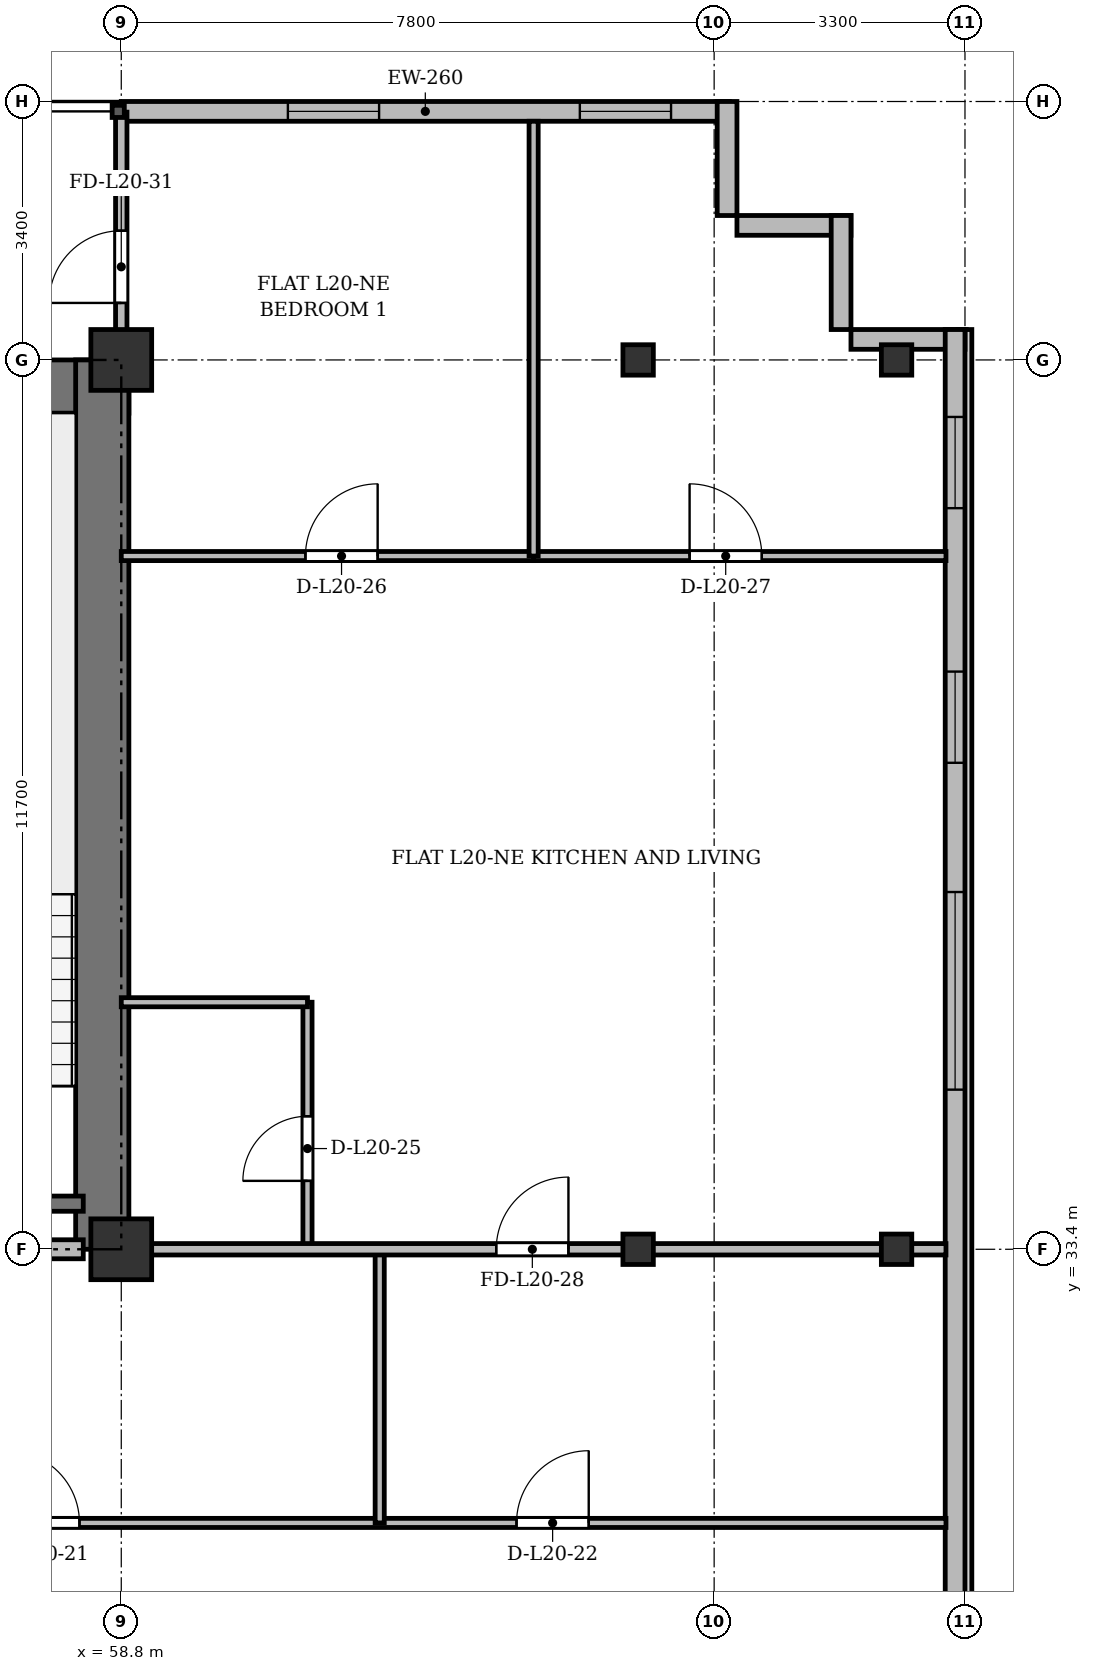
"""IFC4 building model, lengths in metres.
Left out: names, types, materials, properties, quantities, classifications, styles, units other than length and angle.
Written with IfcOpenShell. Run it as: python <this file> out.ifc"""

import sys

from ifc_helpers import new_model, si_unit, direction, frame, frame_2d, origin, origin_2d, place, context, subcontext, project, spatial, rectangle, i_section, extrude, source, transform, mapped, element, fill, save


model = new_model("IFC4")
c1 = context("Model", 3, precision=1e-05, world=origin(), true_north=direction((0.0, 1.0)))
c2 = subcontext(c1, "Body", "Model", "MODEL_VIEW")
j1 = project(units=[si_unit("LENGTHUNIT", "METRE"), si_unit("PLANEANGLEUNIT", "RADIAN")], contexts=[c1])
p1 = place(None, origin())
s1 = spatial("IfcSite", under=j1, at=p1, CompositionType="ELEMENT")
p2 = place(p1, origin())
s2 = spatial("IfcBuilding", under=s1, at=p2, CompositionType="ELEMENT")
p3 = place(p2, frame((0.0, 0.0, 81.7)))
s3 = spatial("IfcBuildingStorey", under=s2, at=p3, CompositionType="ELEMENT", Elevation=81.7)
m1 = source(origin(), c2, "Body", "SweptSolid", [
    extrude(rectangle(XDim=0.8, YDim=0.8, at=origin_2d()), origin(), (0.0, 0.0, 1.0), 3.6),
])
for number, where, z_axis, x_axis in (
    (1, (58.8, 33.4, 0.0), (0.0, 0.0, 1.0), (1.0, 0.0, 0.0)),
    (2, (58.8, 45.1, 0.0), (0.0, 0.0, 1.0), (1.0, 0.0, 0.0)),
):
    element("IfcColumn", number, at=place(p3, frame(where, z_axis=z_axis, x_axis=x_axis)), inside=s3, PredefinedType="COLUMN", context=c2, shape_type="MappedRepresentation", body=[
        mapped(m1, transform((0.0, 0.0, 0.0), x_axis=(1.0, 0.0, 0.0), y_axis=(0.0, 1.0, 0.0), z_axis=(0.0, 0.0, 1.0), scale=1.0)),
    ])
m2 = source(origin(), c2, "Body", "SweptSolid", [
    extrude(i_section(OverallWidth=0.4, OverallDepth=0.4, WebThickness=0.022, FlangeThickness=0.035, at=origin_2d()), origin(), (0.0, 0.0, 1.0), 3.6),
])
for number, where, z_axis, x_axis in (
    (3, (65.6, 33.4, 0.0), (0.0, 0.0, 1.0), (1.0, 0.0, 0.0)),
    (4, (65.6, 45.1, 0.0), (0.0, 0.0, 1.0), (1.0, 0.0, 0.0)),
    (5, (69.0, 33.4, 0.0), (0.0, 0.0, 1.0), (1.0, 0.0, 0.0)),
    (6, (69.0, 45.1, 0.0), (0.0, 0.0, 1.0), (1.0, 0.0, 0.0)),
):
    element("IfcColumn", number, at=place(p3, frame(where, z_axis=z_axis, x_axis=x_axis)), inside=s3, PredefinedType="COLUMN", context=c2, shape_type="MappedRepresentation", body=[
        mapped(m2, transform((0.0, 0.0, 0.0), x_axis=(1.0, 0.0, 0.0), y_axis=(0.0, 1.0, 0.0), z_axis=(0.0, 0.0, 1.0), scale=1.0)),
    ])
p4 = place(p3, frame((58.8, 48.37, 0.0), z_axis=(0.0, 0.0, 1.0), x_axis=(1.0, 0.0, 0.0)))
e7 = element("IfcWall", 7, at=p4, inside=s3, PredefinedType="SOLIDWALL", context=c2, shape_type="SweptSolid", body=[
    extrude(rectangle(XDim=8.0, YDim=0.26, at=frame_2d((4.0, 0.0))), origin(), (0.0, 0.0, 1.0), 3.34),
])
p5 = place(p4, frame((2.192, 0.0, 0.9)))
e8 = element("IfcOpeningElement", 8, at=p5, cuts=e7, PredefinedType="OPENING", context=c2, shape_type="SweptSolid", body=[
    extrude(rectangle(XDim=1.2, YDim=1.65, at=frame_2d((0.6, 0.825))), frame((0.0, 0.14, 0.0), z_axis=(0.0, -1.0, 0.0), x_axis=(1.0, 0.0, 0.0)), (0.0, 0.0, 1.0), 0.28),
])
p6 = place(p4, frame((6.033, 0.0, 0.9)))
e9 = element("IfcOpeningElement", 9, at=p6, cuts=e7, PredefinedType="OPENING", context=c2, shape_type="SweptSolid", body=[
    extrude(rectangle(XDim=1.2, YDim=1.65, at=frame_2d((0.6, 0.825))), frame((0.0, 0.14, 0.0), z_axis=(0.0, -1.0, 0.0), x_axis=(1.0, 0.0, 0.0)), (0.0, 0.0, 1.0), 0.28),
])
for number, where, z_axis, x_axis in (
    (10, (66.77, 48.5, 0.0), (0.0, 0.0, 1.0), (0.0, -1.0, 0.0)),
    (11, (66.9, 46.87, 0.0), (0.0, 0.0, 1.0), (1.0, 0.0, 0.0)),
    (12, (68.27, 47.0, 0.0), (0.0, 0.0, 1.0), (0.0, -1.0, 0.0)),
):
    element("IfcWall", number, at=place(p3, frame(where, z_axis=z_axis, x_axis=x_axis)), inside=s3, PredefinedType="SOLIDWALL", context=c2, shape_type="SweptSolid", body=[
        extrude(rectangle(XDim=1.5, YDim=0.26, at=frame_2d((0.75, 0.0))), origin(), (0.0, 0.0, 1.0), 3.34),
    ])
p7 = place(p3, frame((68.4, 45.37, 0.0), z_axis=(0.0, 0.0, 1.0), x_axis=(1.0, 0.0, 0.0)))
e13 = element("IfcWall", 13, at=p7, inside=s3, PredefinedType="SOLIDWALL", context=c2, shape_type="SweptSolid", body=[
    extrude(rectangle(XDim=1.5, YDim=0.26, at=frame_2d((0.75, 0.0))), origin(), (0.0, 0.0, 1.0), 2.752),
])
p8 = place(p3, frame((69.77, 45.5, 0.0), z_axis=(0.0, 0.0, 1.0), x_axis=(0.0, -1.0, 0.0)))
e14 = element("IfcWall", 14, at=p8, inside=s3, PredefinedType="SOLIDWALL", context=c2, shape_type="SweptSolid", body=[
    extrude(rectangle(XDim=39.6, YDim=0.26, at=frame_2d((19.8, 0.0))), origin(), (0.0, 0.0, 1.0), 3.34),
])
p9 = place(p8, frame((36.95, 0.0, 0.92)))
e15 = element("IfcOpeningElement", 15, at=p9, cuts=e14, PredefinedType="OPENING", context=c2, shape_type="SweptSolid", body=[
    extrude(rectangle(XDim=1.2, YDim=1.65, at=frame_2d((0.6, 0.825))), frame((0.0, 0.14, 0.0), z_axis=(0.0, -1.0, 0.0), x_axis=(1.0, 0.0, 0.0)), (0.0, 0.0, 1.0), 0.28),
])
p10 = place(p8, frame((32.8, 0.0, 0.92)))
e16 = element("IfcOpeningElement", 16, at=p10, cuts=e14, PredefinedType="OPENING", context=c2, shape_type="SweptSolid", body=[
    extrude(rectangle(XDim=2.6, YDim=1.9, at=frame_2d((1.3, 0.95))), frame((0.0, 0.14, 0.0), z_axis=(0.0, -1.0, 0.0), x_axis=(1.0, 0.0, 0.0)), (0.0, 0.0, 1.0), 0.28),
])
p11 = place(p8, frame((28.6, 0.0, 0.92)))
e17 = element("IfcOpeningElement", 17, at=p11, cuts=e14, PredefinedType="OPENING", context=c2, shape_type="SweptSolid", body=[
    extrude(rectangle(XDim=2.6, YDim=1.9, at=frame_2d((1.3, 0.95))), frame((0.0, 0.14, 0.0), z_axis=(0.0, -1.0, 0.0), x_axis=(1.0, 0.0, 0.0)), (0.0, 0.0, 1.0), 0.28),
])
p12 = place(p8, frame((21.4, 0.0, 0.92)))
e18 = element("IfcOpeningElement", 18, at=p12, cuts=e14, PredefinedType="OPENING", context=c2, shape_type="SweptSolid", body=[
    extrude(rectangle(XDim=2.6, YDim=1.9, at=frame_2d((1.3, 0.95))), frame((0.0, 0.14, 0.0), z_axis=(0.0, -1.0, 0.0), x_axis=(1.0, 0.0, 0.0)), (0.0, 0.0, 1.0), 0.28),
])
p13 = place(p8, frame((7.4, 0.0, 0.92)))
e19 = element("IfcOpeningElement", 19, at=p13, cuts=e14, PredefinedType="OPENING", context=c2, shape_type="SweptSolid", body=[
    extrude(rectangle(XDim=2.6, YDim=1.9, at=frame_2d((1.3, 0.95))), frame((0.0, 0.14, 0.0), z_axis=(0.0, -1.0, 0.0), x_axis=(1.0, 0.0, 0.0)), (0.0, 0.0, 1.0), 0.28),
])
p14 = place(p8, frame((4.5, 0.0, 0.92)))
e20 = element("IfcOpeningElement", 20, at=p14, cuts=e14, PredefinedType="OPENING", context=c2, shape_type="SweptSolid", body=[
    extrude(rectangle(XDim=1.2, YDim=1.65, at=frame_2d((0.6, 0.825))), frame((0.0, 0.14, 0.0), z_axis=(0.0, -1.0, 0.0), x_axis=(1.0, 0.0, 0.0)), (0.0, 0.0, 1.0), 0.28),
])
p15 = place(p8, frame((1.15, 0.0, 0.92)))
e21 = element("IfcOpeningElement", 21, at=p15, cuts=e14, PredefinedType="OPENING", context=c2, shape_type="SweptSolid", body=[
    extrude(rectangle(XDim=1.2, YDim=1.65, at=frame_2d((0.6, 0.825))), frame((0.0, 0.14, 0.0), z_axis=(0.0, -1.0, 0.0), x_axis=(1.0, 0.0, 0.0)), (0.0, 0.0, 1.0), 0.28),
])
p16 = place(p3, frame((15.5, 44.75, 0.0), z_axis=(0.0, 0.0, 1.0), x_axis=(1.0, 0.0, 0.0)))
e22 = element("IfcWall", 22, at=p16, inside=s3, PredefinedType="SHEAR", context=c2, shape_type="SweptSolid", body=[
    extrude(rectangle(XDim=43.4, YDim=0.7, at=frame_2d((21.7, 0.0))), origin(), (0.0, 0.0, 1.0), 3.34),
])
p17 = place(p3, frame((58.55, 33.4, 0.0), z_axis=(0.0, 0.0, 1.0), x_axis=(0.0, 1.0, 0.0)))
e23 = element("IfcWall", 23, at=p17, inside=s3, PredefinedType="SHEAR", context=c2, shape_type="SweptSolid", body=[
    extrude(rectangle(XDim=11.7, YDim=0.7, at=frame_2d((5.85, 0.0))), origin(), (0.0, 0.0, 1.0), 3.34),
])
p18 = place(p3, frame((54.9, 34.0, 0.0), z_axis=(0.0, 0.0, 1.0), x_axis=(1.0, 0.0, 0.0)))
e24 = element("IfcWall", 24, at=p18, inside=s3, PredefinedType="SHEAR", context=c2, shape_type="SweptSolid", body=[
    extrude(rectangle(XDim=3.4, YDim=0.2, at=frame_2d((1.7, 0.0))), origin(), (0.0, 0.0, 1.0), 3.34),
])
p19 = place(p3, frame((47.15, 33.4, 0.0), z_axis=(0.0, 0.0, 1.0), x_axis=(1.0, 0.0, 0.0)))
e25 = element("IfcWall", 25, at=p19, inside=s3, PredefinedType="PARTITIONING", context=c2, shape_type="SweptSolid", body=[
    extrude(rectangle(XDim=11.15, YDim=0.25, at=frame_2d((5.575, 0.0))), origin(), (0.0, 0.0, 1.0), 2.752),
])
p20 = place(p19, frame((0.7, 0.0, 0.0)))
e26 = element("IfcOpeningElement", 26, at=p20, cuts=e25, PredefinedType="OPENING", context=c2, shape_type="SweptSolid", body=[
    extrude(rectangle(XDim=0.95, YDim=2.15, at=frame_2d((0.475, 1.075))), frame((0.0, 0.135, 0.0), z_axis=(0.0, -1.0, 0.0), x_axis=(1.0, 0.0, 0.0)), (0.0, 0.0, 1.0), 0.27),
])
p21 = place(p19, frame((6.0, 0.0, 0.0)))
e27 = element("IfcOpeningElement", 27, at=p21, cuts=e25, PredefinedType="OPENING", context=c2, shape_type="SweptSolid", body=[
    extrude(rectangle(XDim=1.2, YDim=2.15, at=frame_2d((0.6, 1.075))), frame((0.0, 0.135, 0.0), z_axis=(0.0, -1.0, 0.0), x_axis=(1.0, 0.0, 0.0)), (0.0, 0.0, 1.0), 0.27),
])
p22 = place(p3, frame((54.8, 29.8, 0.0), z_axis=(0.0, 0.0, 1.0), x_axis=(1.0, 0.0, 0.0)))
e28 = element("IfcWall", 28, at=p22, inside=s3, PredefinedType="PARTITIONING", context=c2, shape_type="SweptSolid", body=[
    extrude(rectangle(XDim=14.85, YDim=0.12, at=frame_2d((7.425, 0.0))), origin(), (0.0, 0.0, 1.0), 2.84),
])
p23 = place(p22, frame((2.5, 0.0, 0.0)))
e29 = element("IfcOpeningElement", 29, at=p23, cuts=e28, PredefinedType="OPENING", context=c2, shape_type="SweptSolid", body=[
    extrude(rectangle(XDim=0.95, YDim=2.15, at=frame_2d((0.475, 1.075))), frame((0.0, 0.07, 0.0), z_axis=(0.0, -1.0, 0.0), x_axis=(1.0, 0.0, 0.0)), (0.0, 0.0, 1.0), 0.14),
])
p24 = place(p22, frame((9.2, 0.0, 0.0)))
e30 = element("IfcOpeningElement", 30, at=p24, cuts=e28, PredefinedType="OPENING", context=c2, shape_type="SweptSolid", body=[
    extrude(rectangle(XDim=0.95, YDim=2.15, at=frame_2d((0.475, 1.075))), frame((0.0, 0.07, 0.0), z_axis=(0.0, -1.0, 0.0), x_axis=(1.0, 0.0, 0.0)), (0.0, 0.0, 1.0), 0.14),
])
p25 = place(p3, frame((62.2, 29.8, 0.0), z_axis=(0.0, 0.0, 1.0), x_axis=(0.0, 1.0, 0.0)))
e31 = element("IfcWall", 31, at=p25, inside=s3, PredefinedType="PARTITIONING", context=c2, shape_type="SweptSolid", body=[
    extrude(rectangle(XDim=3.6, YDim=0.12, at=frame_2d((1.8, 0.0))), origin(), (0.0, 0.0, 1.0), 2.752),
])
p26 = place(p3, frame((61.25, 33.4, 0.0), z_axis=(0.0, 0.0, 1.0), x_axis=(0.0, 1.0, 0.0)))
e32 = element("IfcWall", 32, at=p26, inside=s3, PredefinedType="PARTITIONING", context=c2, shape_type="SweptSolid", body=[
    extrude(rectangle(XDim=3.25, YDim=0.12, at=frame_2d((1.625, 0.0))), origin(), (0.0, 0.0, 1.0), 2.752),
])
p27 = place(p26, frame((0.9, 0.0, 0.0)))
e33 = element("IfcOpeningElement", 33, at=p27, cuts=e32, PredefinedType="OPENING", context=c2, shape_type="SweptSolid", body=[
    extrude(rectangle(XDim=0.85, YDim=2.1, at=frame_2d((0.425, 1.05))), frame((0.0, 0.07, 0.0), z_axis=(0.0, -1.0, 0.0), x_axis=(1.0, 0.0, 0.0)), (0.0, 0.0, 1.0), 0.14),
])
p28 = place(p3, frame((58.8, 36.65, 0.0), z_axis=(0.0, 0.0, 1.0), x_axis=(1.0, 0.0, 0.0)))
e34 = element("IfcWall", 34, at=p28, inside=s3, PredefinedType="PARTITIONING", context=c2, shape_type="SweptSolid", body=[
    extrude(rectangle(XDim=2.45, YDim=0.12, at=frame_2d((1.225, 0.0))), origin(), (0.0, 0.0, 1.0), 2.84),
])
p29 = place(p3, frame((58.8, 42.52, 0.0), z_axis=(0.0, 0.0, 1.0), x_axis=(1.0, 0.0, 0.0)))
e35 = element("IfcWall", 35, at=p29, inside=s3, PredefinedType="PARTITIONING", context=c2, shape_type="SweptSolid", body=[
    extrude(rectangle(XDim=5.425, YDim=0.12, at=frame_2d((2.712, 0.0))), origin(), (0.0, 0.0, 1.0), 2.84),
])
p30 = place(p29, frame((2.423, 0.0, 0.0)))
e36 = element("IfcOpeningElement", 36, at=p30, cuts=e35, PredefinedType="OPENING", context=c2, shape_type="SweptSolid", body=[
    extrude(rectangle(XDim=0.95, YDim=2.15, at=frame_2d((0.475, 1.075))), frame((0.0, 0.07, 0.0), z_axis=(0.0, -1.0, 0.0), x_axis=(1.0, 0.0, 0.0)), (0.0, 0.0, 1.0), 0.14),
])
p31 = place(p3, frame((64.225, 42.52, 0.0), z_axis=(0.0, 0.0, 1.0), x_axis=(1.0, 0.0, 0.0)))
e37 = element("IfcWall", 37, at=p31, inside=s3, PredefinedType="PARTITIONING", context=c2, shape_type="SweptSolid", body=[
    extrude(rectangle(XDim=5.425, YDim=0.12, at=frame_2d((2.712, 0.0))), origin(), (0.0, 0.0, 1.0), 2.84),
])
p32 = place(p31, frame((2.052, 0.0, 0.0)))
e38 = element("IfcOpeningElement", 38, at=p32, cuts=e37, PredefinedType="OPENING", context=c2, shape_type="SweptSolid", body=[
    extrude(rectangle(XDim=0.95, YDim=2.15, at=frame_2d((0.475, 1.075))), frame((0.0, 0.07, 0.0), z_axis=(0.0, -1.0, 0.0), x_axis=(1.0, 0.0, 0.0)), (0.0, 0.0, 1.0), 0.14),
])
p33 = place(p3, frame((64.225, 42.52, 0.0), z_axis=(0.0, 0.0, 1.0), x_axis=(0.0, 1.0, 0.0)))
e39 = element("IfcWall", 39, at=p33, inside=s3, PredefinedType="PARTITIONING", context=c2, shape_type="SweptSolid", body=[
    extrude(rectangle(XDim=5.72, YDim=0.12, at=frame_2d((2.86, 0.0))), origin(), (0.0, 0.0, 1.0), 2.752),
])
p34 = place(p3, frame((58.8, 33.4, 0.0), z_axis=(0.0, 0.0, 1.0), x_axis=(1.0, 0.0, 0.0)))
e40 = element("IfcWall", 40, at=p34, inside=s3, PredefinedType="PARTITIONING", context=c2, shape_type="SweptSolid", body=[
    extrude(rectangle(XDim=10.85, YDim=0.15, at=frame_2d((5.425, 0.0))), origin(), (0.0, 0.0, 1.0), 2.752),
])
p35 = place(p34, frame((4.933, 0.0, 0.0)))
e41 = element("IfcOpeningElement", 41, at=p35, cuts=e40, PredefinedType="OPENING", context=c2, shape_type="SweptSolid", body=[
    extrude(rectangle(XDim=0.95, YDim=2.15, at=frame_2d((0.475, 1.075))), frame((0.0, 0.085, 0.0), z_axis=(0.0, -1.0, 0.0), x_axis=(1.0, 0.0, 0.0)), (0.0, 0.0, 1.0), 0.17),
])
p36 = place(p3, frame((58.8, 44.75, 0.0), z_axis=(0.0, 0.0, 1.0), x_axis=(0.0, 1.0, 0.0)))
e42 = element("IfcWall", 42, at=p36, inside=s3, PredefinedType="PARTITIONING", context=c2, shape_type="SweptSolid", body=[
    extrude(rectangle(XDim=3.61, YDim=0.15, at=frame_2d((1.805, 0.0))), origin(), (0.0, 0.0, 1.0), 2.84),
])
p37 = place(p36, frame((1.1, 0.0, 0.0)))
e43 = element("IfcOpeningElement", 43, at=p37, cuts=e42, PredefinedType="OPENING", context=c2, shape_type="SweptSolid", body=[
    extrude(rectangle(XDim=0.95, YDim=2.15, at=frame_2d((0.475, 1.075))), frame((0.0, 0.085, 0.0), z_axis=(0.0, -1.0, 0.0), x_axis=(1.0, 0.0, 0.0)), (0.0, 0.0, 1.0), 0.17),
])
m3 = source(origin(), c2, "Body", "SweptSolid", [
    extrude(rectangle(XDim=1.2, YDim=1.65, at=frame_2d((0.6, 0.825))), frame((0.0, 0.03, 0.0), z_axis=(0.0, -1.0, 0.0), x_axis=(1.0, 0.0, 0.0)), (0.0, 0.0, 1.0), 0.06),
])
p38 = place(p5, origin())
e44 = element("IfcWindow", 44, at=p38, inside=s3, PartitioningType="SINGLE_PANEL", PredefinedType="WINDOW", context=c2, shape_type="MappedRepresentation", body=[
    mapped(m3, transform((0.0, 0.0, 0.0), x_axis=(1.0, 0.0, 0.0), y_axis=(0.0, 1.0, 0.0), z_axis=(0.0, 0.0, 1.0), scale=1.0)),
])
fill(e8, e44)
p39 = place(p6, origin())
e45 = element("IfcWindow", 45, at=p39, inside=s3, PartitioningType="SINGLE_PANEL", PredefinedType="WINDOW", context=c2, shape_type="MappedRepresentation", body=[
    mapped(m3, transform((0.0, 0.0, 0.0), x_axis=(1.0, 0.0, 0.0), y_axis=(0.0, 1.0, 0.0), z_axis=(0.0, 0.0, 1.0), scale=1.0)),
])
fill(e9, e45)
m4 = source(origin(), c2, "Body", "SweptSolid", [
    extrude(rectangle(XDim=2.6, YDim=1.9, at=frame_2d((1.3, 0.95))), frame((0.0, 0.03, 0.0), z_axis=(0.0, -1.0, 0.0), x_axis=(1.0, 0.0, 0.0)), (0.0, 0.0, 1.0), 0.06),
])
p40 = place(p13, origin())
e46 = element("IfcWindow", 46, at=p40, inside=s3, PartitioningType="SINGLE_PANEL", PredefinedType="WINDOW", context=c2, shape_type="MappedRepresentation", body=[
    mapped(m4, transform((0.0, 0.0, 0.0), x_axis=(1.0, 0.0, 0.0), y_axis=(0.0, 1.0, 0.0), z_axis=(0.0, 0.0, 1.0), scale=1.0)),
])
fill(e19, e46)
p41 = place(p14, origin())
e47 = element("IfcWindow", 47, at=p41, inside=s3, PartitioningType="SINGLE_PANEL", PredefinedType="WINDOW", context=c2, shape_type="MappedRepresentation", body=[
    mapped(m3, transform((0.0, 0.0, 0.0), x_axis=(1.0, 0.0, 0.0), y_axis=(0.0, 1.0, 0.0), z_axis=(0.0, 0.0, 1.0), scale=1.0)),
])
fill(e20, e47)
p42 = place(p15, origin())
e48 = element("IfcWindow", 48, at=p42, inside=s3, PartitioningType="SINGLE_PANEL", PredefinedType="WINDOW", context=c2, shape_type="MappedRepresentation", body=[
    mapped(m3, transform((0.0, 0.0, 0.0), x_axis=(1.0, 0.0, 0.0), y_axis=(0.0, 1.0, 0.0), z_axis=(0.0, 0.0, 1.0), scale=1.0)),
])
fill(e21, e48)
m5 = source(origin(), c2, "Body", "SweptSolid", [
    extrude(rectangle(XDim=0.95, YDim=2.15, at=frame_2d((0.475, 1.075))), frame((0.0, 0.025, 0.0), z_axis=(0.0, -1.0, 0.0), x_axis=(1.0, 0.0, 0.0)), (0.0, 0.0, 1.0), 0.05),
])
p43 = place(p23, origin())
e49 = element("IfcDoor", 49, at=p43, inside=s3, OperationType="SINGLE_SWING_LEFT", PredefinedType="DOOR", context=c2, shape_type="MappedRepresentation", body=[
    mapped(m5, transform((0.0, 0.0, 0.0), x_axis=(1.0, 0.0, 0.0), y_axis=(0.0, 1.0, 0.0), z_axis=(0.0, 0.0, 1.0), scale=1.0)),
])
fill(e29, e49)
p44 = place(p24, origin())
e50 = element("IfcDoor", 50, at=p44, inside=s3, OperationType="SINGLE_SWING_RIGHT", PredefinedType="DOOR", context=c2, shape_type="MappedRepresentation", body=[
    mapped(m5, transform((0.0, 0.0, 0.0), x_axis=(1.0, 0.0, 0.0), y_axis=(0.0, 1.0, 0.0), z_axis=(0.0, 0.0, 1.0), scale=1.0)),
])
fill(e30, e50)
m6 = source(origin(), c2, "Body", "SweptSolid", [
    extrude(rectangle(XDim=0.85, YDim=2.1, at=frame_2d((0.425, 1.05))), frame((0.0, 0.025, 0.0), z_axis=(0.0, -1.0, 0.0), x_axis=(1.0, 0.0, 0.0)), (0.0, 0.0, 1.0), 0.05),
])
p45 = place(p27, origin())
e51 = element("IfcDoor", 51, at=p45, inside=s3, OperationType="SINGLE_SWING_LEFT", PredefinedType="DOOR", context=c2, shape_type="MappedRepresentation", body=[
    mapped(m6, transform((0.0, 0.0, 0.0), x_axis=(1.0, 0.0, 0.0), y_axis=(0.0, 1.0, 0.0), z_axis=(0.0, 0.0, 1.0), scale=1.0)),
])
fill(e33, e51)
p46 = place(p30, origin())
e52 = element("IfcDoor", 52, at=p46, inside=s3, OperationType="SINGLE_SWING_RIGHT", PredefinedType="DOOR", context=c2, shape_type="MappedRepresentation", body=[
    mapped(m5, transform((0.0, 0.0, 0.0), x_axis=(1.0, 0.0, 0.0), y_axis=(0.0, 1.0, 0.0), z_axis=(0.0, 0.0, 1.0), scale=1.0)),
])
fill(e36, e52)
p47 = place(p32, origin())
e53 = element("IfcDoor", 53, at=p47, inside=s3, OperationType="SINGLE_SWING_LEFT", PredefinedType="DOOR", context=c2, shape_type="MappedRepresentation", body=[
    mapped(m5, transform((0.0, 0.0, 0.0), x_axis=(1.0, 0.0, 0.0), y_axis=(0.0, 1.0, 0.0), z_axis=(0.0, 0.0, 1.0), scale=1.0)),
])
fill(e38, e53)
p48 = place(p35, origin())
e54 = element("IfcDoor", 54, at=p48, inside=s3, OperationType="SINGLE_SWING_RIGHT", PredefinedType="DOOR", context=c2, shape_type="MappedRepresentation", body=[
    mapped(m5, transform((0.0, 0.0, 0.0), x_axis=(1.0, 0.0, 0.0), y_axis=(0.0, 1.0, 0.0), z_axis=(0.0, 0.0, 1.0), scale=1.0)),
])
fill(e41, e54)
p49 = place(p37, origin())
e55 = element("IfcDoor", 55, at=p49, inside=s3, OperationType="SINGLE_SWING_LEFT", PredefinedType="DOOR", context=c2, shape_type="MappedRepresentation", body=[
    mapped(m5, transform((0.0, 0.0, 0.0), x_axis=(1.0, 0.0, 0.0), y_axis=(0.0, 1.0, 0.0), z_axis=(0.0, 0.0, 1.0), scale=1.0)),
])
fill(e43, e55)
save(model, sys.argv[1])
